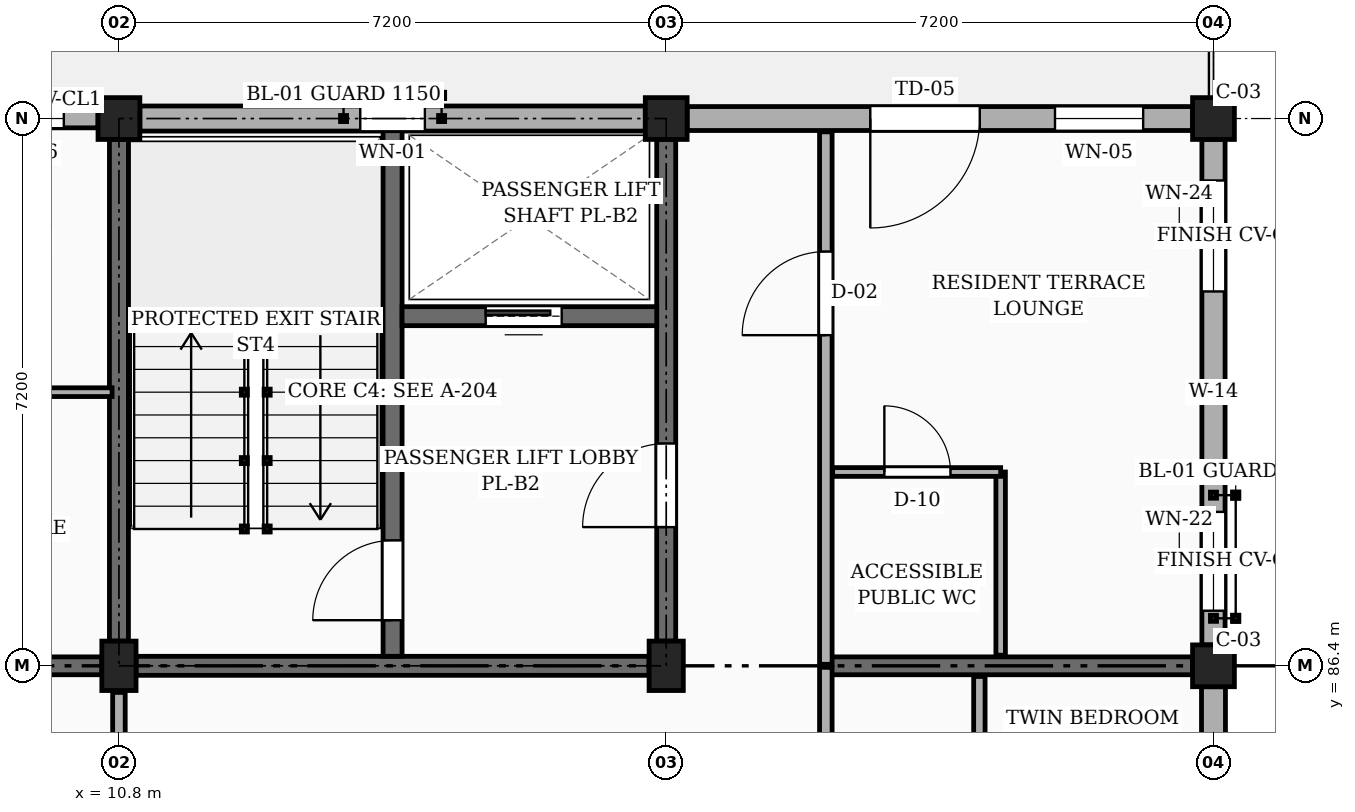
"""IFC4 building model, lengths in metres.
Left out: names, types, materials, properties, quantities, classifications, styles, units other than length and angle.
Written with IfcOpenShell. Run it as: python <this file> out.ifc"""

import sys

from ifc_helpers import new_model, si_unit, direction, frame, frame_2d, origin, origin_2d, place, context, subcontext, project, spatial, rectangle, extrude, element, fill, save


model = new_model("IFC4")
c1 = context("Model", 3, precision=1e-05, world=origin(), true_north=direction((0.0, 1.0)))
c2 = subcontext(c1, "Body", "Model", "MODEL_VIEW")
j1 = project(units=[si_unit("LENGTHUNIT", "METRE"), si_unit("PLANEANGLEUNIT", "RADIAN")], contexts=[c1])
p1 = place(None, origin())
s1 = spatial("IfcSite", under=j1, at=p1, CompositionType="ELEMENT")
p2 = place(p1, origin())
s2 = spatial("IfcBuilding", under=s1, at=p2, CompositionType="ELEMENT")
p3 = place(p2, frame((0.0, 0.0, 20.25)))
s3 = spatial("IfcBuildingStorey", under=s2, at=p3, CompositionType="ELEMENT", Elevation=20.25)
p4 = place(p3, frame((10.8, 86.4, 0.0), z_axis=(0.0, 0.0, 1.0), x_axis=(1.0, 0.0, 0.0)))
e1 = element("IfcColumn", 1, at=p4, inside=s3, PredefinedType="COLUMN", context=c2, shape_type="SweptSolid", body=[
    extrude(rectangle(XDim=0.45, YDim=0.65, at=origin_2d()), origin(), (0.0, 0.0, 1.0), 3.15),
])
p5 = place(p3, frame((10.8, 93.6, 0.0), z_axis=(0.0, 0.0, 1.0), x_axis=(1.0, 0.0, 0.0)))
e2 = element("IfcColumn", 2, at=p5, inside=s3, PredefinedType="COLUMN", context=c2, shape_type="SweptSolid", body=[
    extrude(rectangle(XDim=0.55, YDim=0.55, at=origin_2d()), origin(), (0.0, 0.0, 1.0), 3.15),
])
p6 = place(p3, frame((18.0, 86.4, 0.0), z_axis=(0.0, 0.0, 1.0), x_axis=(1.0, 0.0, 0.0)))
e3 = element("IfcColumn", 3, at=p6, inside=s3, PredefinedType="COLUMN", context=c2, shape_type="SweptSolid", body=[
    extrude(rectangle(XDim=0.45, YDim=0.65, at=origin_2d()), origin(), (0.0, 0.0, 1.0), 3.15),
])
for number, where, z_axis, x_axis in (
    (4, (18.0, 93.6, 0.0), (0.0, 0.0, 1.0), (1.0, 0.0, 0.0)),
    (5, (25.2, 86.4, 0.0), (0.0, 0.0, 1.0), (1.0, 0.0, 0.0)),
    (6, (25.2, 93.6, 0.0), (0.0, 0.0, 1.0), (1.0, 0.0, 0.0)),
):
    element("IfcColumn", number, at=place(p3, frame(where, z_axis=z_axis, x_axis=x_axis)), inside=s3, PredefinedType="COLUMN", context=c2, shape_type="SweptSolid", body=[
        extrude(rectangle(XDim=0.55, YDim=0.55, at=origin_2d()), origin(), (0.0, 0.0, 1.0), 3.15),
    ])
p7 = place(p3, frame((3.875, 86.4, 0.0), z_axis=(0.0, 0.0, 1.0), x_axis=(1.0, 0.0, 0.0)))
e7 = element("IfcWall", 7, at=p7, inside=s3, PredefinedType="SOLIDWALL", context=c2, shape_type="SweptSolid", body=[
    extrude(rectangle(XDim=6.7, YDim=0.235, at=frame_2d((3.35, 0.0))), origin(), (0.0, 0.0, 1.0), 2.21),
])
p8 = place(p7, frame((1.35, 0.0, 0.0)))
e8 = element("IfcOpeningElement", 8, at=p8, cuts=e7, PredefinedType="OPENING", context=c2, shape_type="SweptSolid", body=[
    extrude(rectangle(XDim=0.98, YDim=2.12, at=frame_2d((0.49, 1.06))), frame((0.0, 0.127, 0.0), z_axis=(0.0, -1.0, 0.0), x_axis=(1.0, 0.0, 0.0)), (0.0, 0.0, 1.0), 0.255),
])
p9 = place(p3, frame((20.1, 86.4, 0.0), z_axis=(0.0, 0.0, 1.0), x_axis=(1.0, 0.0, 0.0)))
e9 = element("IfcWall", 9, at=p9, inside=s3, PredefinedType="SOLIDWALL", context=c2, shape_type="SweptSolid", body=[
    extrude(rectangle(XDim=4.825, YDim=0.235, at=frame_2d((2.413, 0.0))), origin(), (0.0, 0.0, 1.0), 2.21),
])
p10 = place(p3, frame((25.2, 82.22, 0.0), z_axis=(0.0, 0.0, 1.0), x_axis=(0.0, 1.0, 0.0)))
e10 = element("IfcWall", 10, at=p10, inside=s3, PredefinedType="SOLIDWALL", context=c2, shape_type="SweptSolid", body=[
    extrude(rectangle(XDim=3.905, YDim=0.315, at=frame_2d((1.953, 0.0))), origin(), (0.0, 0.0, 1.0), 2.48),
])
p11 = place(p10, frame((1.647, 0.0, 0.78)))
e11 = element("IfcOpeningElement", 11, at=p11, cuts=e10, PredefinedType="OPENING", context=c2, shape_type="SweptSolid", body=[
    extrude(rectangle(XDim=1.22, YDim=1.36, at=frame_2d((0.61, 0.68))), frame((0.0, 0.167, 0.0), z_axis=(0.0, -1.0, 0.0), x_axis=(1.0, 0.0, 0.0)), (0.0, 0.0, 1.0), 0.335),
])
p12 = place(p3, frame((25.2, 86.675, 0.0), z_axis=(0.0, 0.0, 1.0), x_axis=(0.0, 1.0, 0.0)))
e12 = element("IfcWall", 12, at=p12, inside=s3, PredefinedType="SOLIDWALL", context=c2, shape_type="SweptSolid", body=[
    extrude(rectangle(XDim=6.65, YDim=0.305, at=frame_2d((3.325, 0.0))), origin(), (0.0, 0.0, 1.0), 2.48),
])
p13 = place(p12, frame((0.45, 0.0, 0.78)))
e13 = element("IfcOpeningElement", 13, at=p13, cuts=e12, PredefinedType="OPENING", context=c2, shape_type="SweptSolid", body=[
    extrude(rectangle(XDim=1.3, YDim=1.36, at=frame_2d((0.65, 0.68))), frame((0.0, 0.163, 0.0), z_axis=(0.0, -1.0, 0.0), x_axis=(1.0, 0.0, 0.0)), (0.0, 0.0, 1.0), 0.325),
])
p14 = place(p12, frame((4.65, 0.0, 0.78)))
e14 = element("IfcOpeningElement", 14, at=p14, cuts=e12, PredefinedType="OPENING", context=c2, shape_type="SweptSolid", body=[
    extrude(rectangle(XDim=1.46, YDim=1.36, at=frame_2d((0.73, 0.68))), frame((0.0, 0.163, 0.0), z_axis=(0.0, -1.0, 0.0), x_axis=(1.0, 0.0, 0.0)), (0.0, 0.0, 1.0), 0.325),
])
p15 = place(p3, frame((24.925, 93.6, 0.0), z_axis=(0.0, 0.0, 1.0), x_axis=(-1.0, 0.0, 0.0)))
e15 = element("IfcWall", 15, at=p15, inside=s3, PredefinedType="SOLIDWALL", context=c2, shape_type="SweptSolid", body=[
    extrude(rectangle(XDim=6.65, YDim=0.315, at=frame_2d((3.325, 0.0))), origin(), (0.0, 0.0, 1.0), 2.48),
])
p16 = place(p15, frame((2.8, 0.0, 0.0)))
e16 = element("IfcOpeningElement", 16, at=p16, cuts=e15, PredefinedType="OPENING", context=c2, shape_type="SweptSolid", body=[
    extrude(rectangle(XDim=1.44, YDim=2.12, at=frame_2d((0.72, 1.06))), frame((0.0, 0.167, 0.0), z_axis=(0.0, -1.0, 0.0), x_axis=(1.0, 0.0, 0.0)), (0.0, 0.0, 1.0), 0.335),
])
p17 = place(p15, frame((0.65, 0.0, 0.78)))
e17 = element("IfcOpeningElement", 17, at=p17, cuts=e15, PredefinedType="OPENING", context=c2, shape_type="SweptSolid", body=[
    extrude(rectangle(XDim=1.16, YDim=1.15, at=frame_2d((0.58, 0.575))), frame((0.0, 0.167, 0.0), z_axis=(0.0, -1.0, 0.0), x_axis=(1.0, 0.0, 0.0)), (0.0, 0.0, 1.0), 0.335),
])
p18 = place(p3, frame((17.725, 93.6, 0.0), z_axis=(0.0, 0.0, 1.0), x_axis=(-1.0, 0.0, 0.0)))
e18 = element("IfcWall", 18, at=p18, inside=s3, PredefinedType="SOLIDWALL", context=c2, shape_type="SweptSolid", body=[
    extrude(rectangle(XDim=6.65, YDim=0.33, at=frame_2d((3.325, 0.0))), origin(), (0.0, 0.0, 1.0), 2.48),
])
p19 = place(p18, frame((2.9, 0.0, 0.9)))
e19 = element("IfcOpeningElement", 19, at=p19, cuts=e18, PredefinedType="OPENING", context=c2, shape_type="SweptSolid", body=[
    extrude(rectangle(XDim=0.85, YDim=1.15, at=frame_2d((0.425, 0.575))), frame((0.0, 0.175, 0.0), z_axis=(0.0, -1.0, 0.0), x_axis=(1.0, 0.0, 0.0)), (0.0, 0.0, 1.0), 0.35),
])
p20 = place(p3, frame((10.525, 93.6, 0.0), z_axis=(0.0, 0.0, 1.0), x_axis=(-1.0, 0.0, 0.0)))
e20 = element("IfcWall", 20, at=p20, inside=s3, PredefinedType="SOLIDWALL", context=c2, shape_type="SweptSolid", body=[
    extrude(rectangle(XDim=6.65, YDim=0.245, at=frame_2d((3.325, 0.0))), origin(), (0.0, 0.0, 1.0), 2.48),
])
p21 = place(p20, frame((0.45, 0.0, 0.78)))
e21 = element("IfcOpeningElement", 21, at=p21, cuts=e20, PredefinedType="OPENING", context=c2, shape_type="SweptSolid", body=[
    extrude(rectangle(XDim=1.05, YDim=1.44, at=frame_2d((0.525, 0.72))), frame((0.0, 0.133, 0.0), z_axis=(0.0, -1.0, 0.0), x_axis=(1.0, 0.0, 0.0)), (0.0, 0.0, 1.0), 0.265),
])
p22 = place(p20, frame((4.65, 0.0, 0.78)))
e22 = element("IfcOpeningElement", 22, at=p22, cuts=e20, PredefinedType="OPENING", context=c2, shape_type="SweptSolid", body=[
    extrude(rectangle(XDim=1.25, YDim=1.44, at=frame_2d((0.625, 0.72))), frame((0.0, 0.133, 0.0), z_axis=(0.0, -1.0, 0.0), x_axis=(1.0, 0.0, 0.0)), (0.0, 0.0, 1.0), 0.265),
])
p23 = place(p3, frame((10.8, 86.725, 0.0), z_axis=(0.0, 0.0, 1.0), x_axis=(0.0, 1.0, 0.0)))
e23 = element("IfcWall", 23, at=p23, inside=s3, PredefinedType="SHEAR", context=c2, shape_type="SweptSolid", body=[
    extrude(rectangle(XDim=6.6, YDim=0.25, at=frame_2d((3.3, 0.0))), origin(), (0.0, 0.0, 1.0), 2.91),
])
p24 = place(p3, frame((18.0, 86.725, 0.0), z_axis=(0.0, 0.0, 1.0), x_axis=(0.0, 1.0, 0.0)))
e24 = element("IfcWall", 24, at=p24, inside=s3, PredefinedType="SHEAR", context=c2, shape_type="SweptSolid", body=[
    extrude(rectangle(XDim=6.6, YDim=0.25, at=frame_2d((3.3, 0.0))), origin(), (0.0, 0.0, 1.0), 2.91),
])
p25 = place(p24, frame((1.5, 0.0, 0.0)))
e25 = element("IfcOpeningElement", 25, at=p25, cuts=e24, PredefinedType="OPENING", context=c2, shape_type="SweptSolid", body=[
    extrude(rectangle(XDim=1.1, YDim=2.15, at=frame_2d((0.55, 1.075))), frame((0.0, 0.135, 0.0), z_axis=(0.0, -1.0, 0.0), x_axis=(1.0, 0.0, 0.0)), (0.0, 0.0, 1.0), 0.27),
])
p26 = place(p3, frame((11.025, 86.4, 0.0), z_axis=(0.0, 0.0, 1.0), x_axis=(1.0, 0.0, 0.0)))
e26 = element("IfcWall", 26, at=p26, inside=s3, PredefinedType="SHEAR", context=c2, shape_type="SweptSolid", body=[
    extrude(rectangle(XDim=6.75, YDim=0.25, at=frame_2d((3.375, 0.0))), origin(), (0.0, 0.0, 1.0), 2.91),
])
p27 = place(p3, frame((14.4, 86.525, 0.0), z_axis=(0.0, 0.0, 1.0), x_axis=(0.0, 1.0, 0.0)))
e27 = element("IfcWall", 27, at=p27, inside=s3, PredefinedType="SHEAR", context=c2, shape_type="SweptSolid", body=[
    extrude(rectangle(XDim=6.915, YDim=0.25, at=frame_2d((3.458, 0.0))), origin(), (0.0, 0.0, 1.0), 2.91),
])
p28 = place(p27, frame((0.475, 0.0, 0.0)))
e28 = element("IfcOpeningElement", 28, at=p28, cuts=e27, PredefinedType="OPENING", context=c2, shape_type="SweptSolid", body=[
    extrude(rectangle(XDim=1.05, YDim=2.15, at=frame_2d((0.525, 1.075))), frame((0.0, 0.135, 0.0), z_axis=(0.0, -1.0, 0.0), x_axis=(1.0, 0.0, 0.0)), (0.0, 0.0, 1.0), 0.27),
])
p29 = place(p3, frame((14.525, 91.0, 0.0), z_axis=(0.0, 0.0, 1.0), x_axis=(1.0, 0.0, 0.0)))
e29 = element("IfcWall", 29, at=p29, inside=s3, PredefinedType="SHEAR", context=c2, shape_type="SweptSolid", body=[
    extrude(rectangle(XDim=3.35, YDim=0.25, at=frame_2d((1.675, 0.0))), origin(), (0.0, 0.0, 1.0), 2.91),
])
p30 = place(p29, frame((1.1, 0.0, 0.0)))
e30 = element("IfcOpeningElement", 30, at=p30, cuts=e29, PredefinedType="OPENING", context=c2, shape_type="SweptSolid", body=[
    extrude(rectangle(XDim=1.0, YDim=2.2, at=frame_2d((0.5, 1.1))), frame((0.0, 0.135, 0.0), z_axis=(0.0, -1.0, 0.0), x_axis=(1.0, 0.0, 0.0)), (0.0, 0.0, 1.0), 0.27),
])
p31 = place(p3, frame((20.1, 79.22, 0.0), z_axis=(0.0, 0.0, 1.0), x_axis=(0.0, 1.0, 0.0)))
e31 = element("IfcWall", 31, at=p31, inside=s3, PredefinedType="PARTITIONING", context=c2, shape_type="SweptSolid", body=[
    extrude(rectangle(XDim=7.16, YDim=0.165, at=frame_2d((3.58, 0.0))), origin(), (0.0, 0.0, 1.0), 2.345),
])
p32 = place(p31, frame((1.33, 0.0, 0.0)))
e32 = element("IfcOpeningElement", 32, at=p32, cuts=e31, PredefinedType="OPENING", context=c2, shape_type="SweptSolid", body=[
    extrude(rectangle(XDim=1.14, YDim=2.18, at=frame_2d((0.57, 1.09))), frame((0.0, 0.093, 0.0), z_axis=(0.0, -1.0, 0.0), x_axis=(1.0, 0.0, 0.0)), (0.0, 0.0, 1.0), 0.185),
])
p33 = place(p3, frame((20.1, 86.42, 0.0), z_axis=(0.0, 0.0, 1.0), x_axis=(0.0, 1.0, 0.0)))
e33 = element("IfcWall", 33, at=p33, inside=s3, PredefinedType="PARTITIONING", context=c2, shape_type="SweptSolid", body=[
    extrude(rectangle(XDim=7.005, YDim=0.165, at=frame_2d((3.502, 0.0))), origin(), (0.0, 0.0, 1.0), 2.345),
])
p34 = place(p33, frame((4.33, 0.0, 0.0)))
e34 = element("IfcOpeningElement", 34, at=p34, cuts=e33, PredefinedType="OPENING", context=c2, shape_type="SweptSolid", body=[
    extrude(rectangle(XDim=1.1, YDim=2.15, at=frame_2d((0.55, 1.075))), frame((0.0, 0.093, 0.0), z_axis=(0.0, -1.0, 0.0), x_axis=(1.0, 0.0, 0.0)), (0.0, 0.0, 1.0), 0.185),
])
p35 = place(p3, frame((10.8, 79.55, 0.0), z_axis=(0.0, 0.0, 1.0), x_axis=(0.0, 1.0, 0.0)))
e35 = element("IfcWall", 35, at=p35, inside=s3, PredefinedType="PARTITIONING", context=c2, shape_type="SweptSolid", body=[
    extrude(rectangle(XDim=6.5, YDim=0.165, at=frame_2d((3.25, 0.0))), origin(), (0.0, 0.0, 1.0), 2.345),
])
p36 = place(p35, frame((1.1, 0.0, 0.0)))
e36 = element("IfcOpeningElement", 36, at=p36, cuts=e35, PredefinedType="OPENING", context=c2, shape_type="SweptSolid", body=[
    extrude(rectangle(XDim=1.14, YDim=2.18, at=frame_2d((0.57, 1.09))), frame((0.0, 0.093, 0.0), z_axis=(0.0, -1.0, 0.0), x_axis=(1.0, 0.0, 0.0)), (0.0, 0.0, 1.0), 0.185),
])
p37 = place(p3, frame((22.12, 79.34, 0.0), z_axis=(0.0, 0.0, 1.0), x_axis=(0.0, 1.0, 0.0)))
e37 = element("IfcWall", 37, at=p37, inside=s3, PredefinedType="PARTITIONING", context=c2, shape_type="SweptSolid", body=[
    extrude(rectangle(XDim=6.92, YDim=0.15, at=frame_2d((3.46, 0.0))), origin(), (0.0, 0.0, 1.0), 2.345),
])
p38 = place(p37, frame((1.31, 0.0, 0.0)))
e38 = element("IfcOpeningElement", 38, at=p38, cuts=e37, PredefinedType="OPENING", context=c2, shape_type="SweptSolid", body=[
    extrude(rectangle(XDim=0.95, YDim=2.1, at=frame_2d((0.475, 1.05))), frame((0.0, 0.085, 0.0), z_axis=(0.0, -1.0, 0.0), x_axis=(1.0, 0.0, 0.0)), (0.0, 0.0, 1.0), 0.17),
])
p39 = place(p3, frame((3.775, 90.0, 0.0), z_axis=(0.0, 0.0, 1.0), x_axis=(1.0, 0.0, 0.0)))
e39 = element("IfcWall", 39, at=p39, inside=s3, PredefinedType="PARTITIONING", context=c2, shape_type="SweptSolid", body=[
    extrude(rectangle(XDim=6.935, YDim=0.115, at=frame_2d((3.468, 0.0))), origin(), (0.0, 0.0, 1.0), 2.345),
])
p40 = place(p39, frame((2.6, 0.0, 0.0)))
e40 = element("IfcOpeningElement", 40, at=p40, cuts=e39, PredefinedType="OPENING", context=c2, shape_type="SweptSolid", body=[
    extrude(rectangle(XDim=0.92, YDim=2.1, at=frame_2d((0.46, 1.05))), frame((0.0, 0.067, 0.0), z_axis=(0.0, -1.0, 0.0), x_axis=(1.0, 0.0, 0.0)), (0.0, 0.0, 1.0), 0.135),
])
p41 = place(p3, frame((22.4, 86.54, 0.0), z_axis=(0.0, 0.0, 1.0), x_axis=(0.0, 1.0, 0.0)))
e41 = element("IfcWall", 41, at=p41, inside=s3, PredefinedType="PARTITIONING", context=c2, shape_type="SweptSolid", body=[
    extrude(rectangle(XDim=2.41, YDim=0.125, at=frame_2d((1.205, 0.0))), origin(), (0.0, 0.0, 1.0), 2.345),
])
p42 = place(p3, frame((20.19, 88.95, 0.0), z_axis=(0.0, 0.0, 1.0), x_axis=(1.0, 0.0, 0.0)))
e42 = element("IfcWall", 42, at=p42, inside=s3, PredefinedType="PARTITIONING", context=c2, shape_type="SweptSolid", body=[
    extrude(rectangle(XDim=2.21, YDim=0.115, at=frame_2d((1.105, 0.0))), origin(), (0.0, 0.0, 1.0), 2.345),
])
p43 = place(p42, frame((0.68, 0.0, 0.0)))
e43 = element("IfcOpeningElement", 43, at=p43, cuts=e42, PredefinedType="OPENING", context=c2, shape_type="SweptSolid", body=[
    extrude(rectangle(XDim=0.87, YDim=2.05, at=frame_2d((0.435, 1.025))), frame((0.0, 0.067, 0.0), z_axis=(0.0, -1.0, 0.0), x_axis=(1.0, 0.0, 0.0)), (0.0, 0.0, 1.0), 0.135),
])
p44 = place(p13, origin())
e44 = element("IfcWindow", 44, at=p44, inside=s3, PartitioningType="SINGLE_PANEL", PredefinedType="WINDOW", context=c2, shape_type="SweptSolid", body=[
    extrude(rectangle(XDim=1.3, YDim=1.36, at=frame_2d((0.65, 0.68))), frame((0.0, 0.03, 0.0), z_axis=(0.0, -1.0, 0.0), x_axis=(1.0, 0.0, 0.0)), (0.0, 0.0, 1.0), 0.06),
])
fill(e13, e44)
p45 = place(p14, origin())
e45 = element("IfcWindow", 45, at=p45, inside=s3, PartitioningType="SINGLE_PANEL", PredefinedType="WINDOW", context=c2, shape_type="SweptSolid", body=[
    extrude(rectangle(XDim=1.46, YDim=1.36, at=frame_2d((0.73, 0.68))), frame((0.0, 0.03, 0.0), z_axis=(0.0, -1.0, 0.0), x_axis=(1.0, 0.0, 0.0)), (0.0, 0.0, 1.0), 0.06),
])
fill(e14, e45)
p46 = place(p16, frame((1.44, 0.0, 0.0), z_axis=(0.0, 0.0, 1.0), x_axis=(-1.0, 0.0, 0.0)))
e46 = element("IfcDoor", 46, at=p46, inside=s3, OperationType="SINGLE_SWING_RIGHT", PredefinedType="DOOR", context=c2, shape_type="SweptSolid", body=[
    extrude(rectangle(XDim=1.44, YDim=2.12, at=frame_2d((0.72, 1.06))), frame((0.0, 0.025, 0.0), z_axis=(0.0, -1.0, 0.0), x_axis=(1.0, 0.0, 0.0)), (0.0, 0.0, 1.0), 0.05),
])
fill(e16, e46)
p47 = place(p17, origin())
e47 = element("IfcWindow", 47, at=p47, inside=s3, PartitioningType="SINGLE_PANEL", PredefinedType="WINDOW", context=c2, shape_type="SweptSolid", body=[
    extrude(rectangle(XDim=1.16, YDim=1.15, at=frame_2d((0.58, 0.575))), frame((0.0, 0.03, 0.0), z_axis=(0.0, -1.0, 0.0), x_axis=(1.0, 0.0, 0.0)), (0.0, 0.0, 1.0), 0.06),
])
fill(e17, e47)
p48 = place(p19, origin())
e48 = element("IfcWindow", 48, at=p48, inside=s3, PartitioningType="SINGLE_PANEL", PredefinedType="WINDOW", context=c2, shape_type="SweptSolid", body=[
    extrude(rectangle(XDim=0.85, YDim=1.15, at=frame_2d((0.425, 0.575))), frame((0.0, 0.03, 0.0), z_axis=(0.0, -1.0, 0.0), x_axis=(1.0, 0.0, 0.0)), (0.0, 0.0, 1.0), 0.06),
])
fill(e19, e48)
p49 = place(p21, origin())
e49 = element("IfcWindow", 49, at=p49, inside=s3, PartitioningType="SINGLE_PANEL", PredefinedType="WINDOW", context=c2, shape_type="SweptSolid", body=[
    extrude(rectangle(XDim=1.05, YDim=1.44, at=frame_2d((0.525, 0.72))), frame((0.0, 0.03, 0.0), z_axis=(0.0, -1.0, 0.0), x_axis=(1.0, 0.0, 0.0)), (0.0, 0.0, 1.0), 0.06),
])
fill(e21, e49)
p50 = place(p25, frame((1.1, 0.0, 0.0), z_axis=(0.0, 0.0, 1.0), x_axis=(-1.0, 0.0, 0.0)))
e50 = element("IfcDoor", 50, at=p50, inside=s3, OperationType="SINGLE_SWING_LEFT", PredefinedType="DOOR", context=c2, shape_type="SweptSolid", body=[
    extrude(rectangle(XDim=1.1, YDim=2.15, at=frame_2d((0.55, 1.075))), frame((0.0, 0.025, 0.0), z_axis=(0.0, -1.0, 0.0), x_axis=(1.0, 0.0, 0.0)), (0.0, 0.0, 1.0), 0.05),
])
fill(e25, e50)
p51 = place(p28, origin())
e51 = element("IfcDoor", 51, at=p51, inside=s3, OperationType="SINGLE_SWING_LEFT", PredefinedType="DOOR", context=c2, shape_type="SweptSolid", body=[
    extrude(rectangle(XDim=1.05, YDim=2.15, at=frame_2d((0.525, 1.075))), frame((0.0, 0.025, 0.0), z_axis=(0.0, -1.0, 0.0), x_axis=(1.0, 0.0, 0.0)), (0.0, 0.0, 1.0), 0.05),
])
fill(e28, e51)
p52 = place(p30, origin())
e52 = element("IfcDoor", 52, at=p52, inside=s3, OperationType="SLIDING_TO_LEFT", PredefinedType="DOOR", context=c2, shape_type="SweptSolid", body=[
    extrude(rectangle(XDim=1.0, YDim=2.2, at=frame_2d((0.5, 1.1))), frame((0.0, 0.025, 0.0), z_axis=(0.0, -1.0, 0.0), x_axis=(1.0, 0.0, 0.0)), (0.0, 0.0, 1.0), 0.05),
])
fill(e30, e52)
p53 = place(p34, origin())
e53 = element("IfcDoor", 53, at=p53, inside=s3, OperationType="SINGLE_SWING_LEFT", PredefinedType="DOOR", context=c2, shape_type="SweptSolid", body=[
    extrude(rectangle(XDim=1.1, YDim=2.15, at=frame_2d((0.55, 1.075))), frame((0.0, 0.025, 0.0), z_axis=(0.0, -1.0, 0.0), x_axis=(1.0, 0.0, 0.0)), (0.0, 0.0, 1.0), 0.05),
])
fill(e34, e53)
p54 = place(p43, origin())
e54 = element("IfcDoor", 54, at=p54, inside=s3, OperationType="SINGLE_SWING_LEFT", PredefinedType="DOOR", context=c2, shape_type="SweptSolid", body=[
    extrude(rectangle(XDim=0.87, YDim=2.05, at=frame_2d((0.435, 1.025))), frame((0.0, 0.025, 0.0), z_axis=(0.0, -1.0, 0.0), x_axis=(1.0, 0.0, 0.0)), (0.0, 0.0, 1.0), 0.05),
])
fill(e43, e54)
save(model, sys.argv[1])
